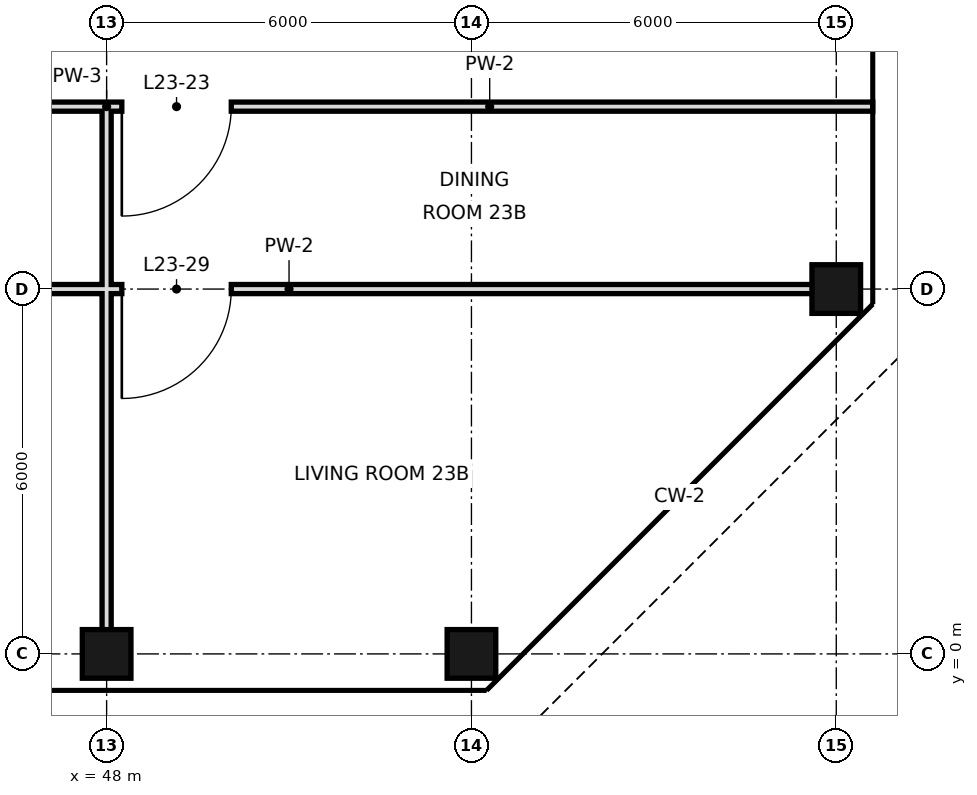
"""IFC4 building model, lengths in metres.
Left out: names, types, materials, properties, quantities, classifications, styles, units other than length and angle.
Written with IfcOpenShell. Run it as: python <this file> out.ifc"""

import sys

from ifc_helpers import new_model, si_unit, direction, frame, frame_2d, origin, origin_2d, place, context, subcontext, project, spatial, rectangle, hollow_rectangle, extrude, element, fill, save


model = new_model("IFC4")
c1 = context("Model", 3, precision=1e-05, world=origin(), true_north=direction((0.0, 1.0)))
c2 = subcontext(c1, "Body", "Model", "MODEL_VIEW")
j1 = project(units=[si_unit("LENGTHUNIT", "METRE"), si_unit("PLANEANGLEUNIT", "RADIAN")], contexts=[c1])
p1 = place(None, origin())
s1 = spatial("IfcSite", under=j1, at=p1, CompositionType="ELEMENT")
p2 = place(p1, origin())
s2 = spatial("IfcBuilding", under=s1, at=p2, CompositionType="ELEMENT")
p3 = place(p2, frame((0.0, 0.0, 107.0)))
s3 = spatial("IfcBuildingStorey", under=s2, at=p3, CompositionType="ELEMENT", Elevation=107.0)
for number, where, z_axis, x_axis in (
    (1, (48.0, 0.0, 0.0), (0.0, 0.0, 1.0), (1.0, 0.0, 0.0)),
    (2, (54.0, 0.0, 0.0), (0.0, 0.0, 1.0), (1.0, 0.0, 0.0)),
    (3, (60.0, 6.0, 0.0), (0.0, 0.0, 1.0), (1.0, 0.0, 0.0)),
):
    element("IfcColumn", number, at=place(p3, frame(where, z_axis=z_axis, x_axis=x_axis)), inside=s3, PredefinedType="COLUMN", context=c2, shape_type="SweptSolid", body=[
        extrude(hollow_rectangle(XDim=0.8, YDim=0.8, WallThickness=0.04, at=origin_2d()), origin(), (0.0, 0.0, 1.0), 3.6),
    ])
p4 = place(p3, frame((48.0, 0.0, 0.0), z_axis=(0.0, 0.0, 1.0), x_axis=(0.0, 1.0, 0.0)))
e4 = element("IfcWall", 4, at=p4, inside=s3, PredefinedType="PARTITIONING", context=c2, shape_type="SweptSolid", body=[
    extrude(rectangle(XDim=6.0, YDim=0.15, at=frame_2d((3.0, 0.0))), origin(), (0.0, 0.0, 1.0), 2.72),
])
p5 = place(p3, frame((48.0, 6.0, 0.0), z_axis=(0.0, 0.0, 1.0), x_axis=(0.0, 1.0, 0.0)))
e5 = element("IfcWall", 5, at=p5, inside=s3, PredefinedType="PARTITIONING", context=c2, shape_type="SweptSolid", body=[
    extrude(rectangle(XDim=3.0, YDim=0.15, at=frame_2d((1.5, 0.0))), origin(), (0.0, 0.0, 1.0), 2.72),
])
p6 = place(p3, frame((48.0, 6.0, 0.0), z_axis=(0.0, 0.0, 1.0), x_axis=(1.0, 0.0, 0.0)))
e6 = element("IfcWall", 6, at=p6, inside=s3, PredefinedType="PARTITIONING", context=c2, shape_type="SweptSolid", body=[
    extrude(rectangle(XDim=12.0, YDim=0.15, at=frame_2d((6.0, 0.0))), origin(), (0.0, 0.0, 1.0), 2.72),
])
p7 = place(p6, frame((0.25, 0.0, 0.0)))
e7 = element("IfcOpeningElement", 7, at=p7, cuts=e6, PredefinedType="OPENING", context=c2, shape_type="SweptSolid", body=[
    extrude(rectangle(XDim=1.8, YDim=2.4, at=frame_2d((0.9, 1.2))), frame((0.0, 0.085, 0.0), z_axis=(0.0, -1.0, 0.0), x_axis=(1.0, 0.0, 0.0)), (0.0, 0.0, 1.0), 0.17),
])
p8 = place(p3, frame((39.6, 6.0, 0.0), z_axis=(0.0, 0.0, 1.0), x_axis=(1.0, 0.0, 0.0)))
e8 = element("IfcWall", 8, at=p8, inside=s3, PredefinedType="PARTITIONING", context=c2, shape_type="SweptSolid", body=[
    extrude(rectangle(XDim=8.4, YDim=0.15, at=frame_2d((4.2, 0.0))), origin(), (0.0, 0.0, 1.0), 2.97),
])
p9 = place(p8, frame((0.75, 0.0, 0.0)))
e9 = element("IfcOpeningElement", 9, at=p9, cuts=e8, PredefinedType="OPENING", context=c2, shape_type="SweptSolid", body=[
    extrude(rectangle(XDim=0.9, YDim=2.4, at=frame_2d((0.45, 1.2))), frame((0.0, 0.085, 0.0), z_axis=(0.0, -1.0, 0.0), x_axis=(1.0, 0.0, 0.0)), (0.0, 0.0, 1.0), 0.17),
])
p10 = place(p3, frame((48.0, 9.0, 0.0), z_axis=(0.0, 0.0, 1.0), x_axis=(1.0, 0.0, 0.0)))
e10 = element("IfcWall", 10, at=p10, inside=s3, PredefinedType="PARTITIONING", context=c2, shape_type="SweptSolid", body=[
    extrude(rectangle(XDim=12.6, YDim=0.15, at=frame_2d((6.3, 0.0))), origin(), (0.0, 0.0, 1.0), 3.42),
])
p11 = place(p10, frame((0.25, 0.0, 0.0)))
e11 = element("IfcOpeningElement", 11, at=p11, cuts=e10, PredefinedType="OPENING", context=c2, shape_type="SweptSolid", body=[
    extrude(rectangle(XDim=1.8, YDim=2.4, at=frame_2d((0.9, 1.2))), frame((0.0, 0.085, 0.0), z_axis=(0.0, -1.0, 0.0), x_axis=(1.0, 0.0, 0.0)), (0.0, 0.0, 1.0), 0.17),
])
p12 = place(p3, frame((39.6, 9.0, 0.0), z_axis=(0.0, 0.0, 1.0), x_axis=(1.0, 0.0, 0.0)))
e12 = element("IfcWall", 12, at=p12, inside=s3, PredefinedType="PARTITIONING", context=c2, shape_type="SweptSolid", body=[
    extrude(rectangle(XDim=8.4, YDim=0.15, at=frame_2d((4.2, 0.0))), origin(), (0.0, 0.0, 1.0), 3.42),
])
p13 = place(p11, frame((1.8, 0.0, 0.0), z_axis=(0.0, 0.0, 1.0), x_axis=(-1.0, 0.0, 0.0)))
e13 = element("IfcDoor", 13, at=p13, inside=s3, OperationType="SINGLE_SWING_RIGHT", PredefinedType="DOOR", context=c2, shape_type="SweptSolid", body=[
    extrude(rectangle(XDim=1.8, YDim=2.4, at=frame_2d((0.9, 1.2))), frame((0.0, 0.025, 0.0), z_axis=(0.0, -1.0, 0.0), x_axis=(1.0, 0.0, 0.0)), (0.0, 0.0, 1.0), 0.05),
])
fill(e11, e13)
p14 = place(p7, frame((1.8, 0.0, 0.0), z_axis=(0.0, 0.0, 1.0), x_axis=(-1.0, 0.0, 0.0)))
e14 = element("IfcDoor", 14, at=p14, inside=s3, OperationType="SINGLE_SWING_RIGHT", PredefinedType="DOOR", context=c2, shape_type="SweptSolid", body=[
    extrude(rectangle(XDim=1.8, YDim=2.4, at=frame_2d((0.9, 1.2))), frame((0.0, 0.025, 0.0), z_axis=(0.0, -1.0, 0.0), x_axis=(1.0, 0.0, 0.0)), (0.0, 0.0, 1.0), 0.05),
])
fill(e7, e14)
save(model, sys.argv[1])
